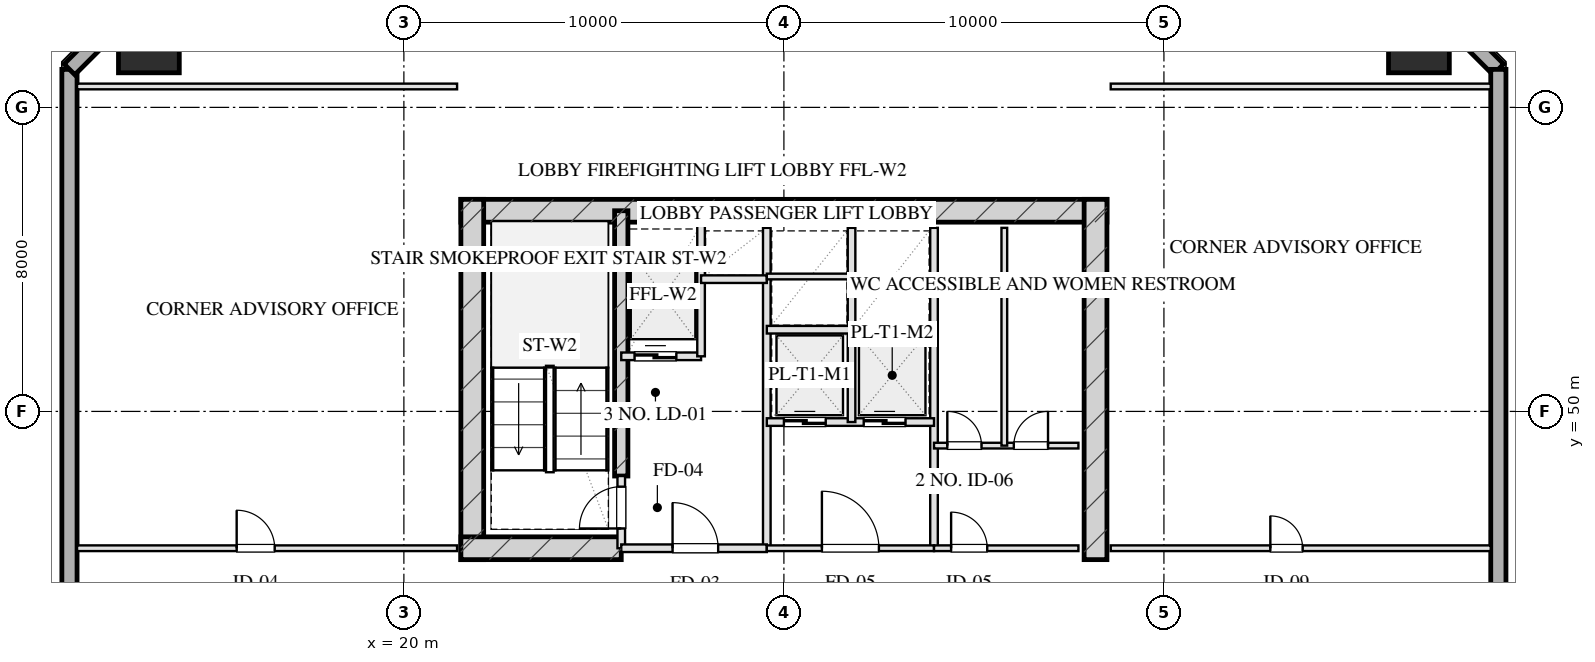
"""IFC4 building model, lengths in metres.
Left out: names, types, materials, properties, quantities, classifications, styles, units other than length and angle.
Written with IfcOpenShell. Run it as: python <this file> out.ifc"""

import sys

from ifc_helpers import new_model, si_unit, direction, frame, frame_2d, origin, origin_2d, place, context, subcontext, project, spatial, rectangle, hollow_rectangle, extrude, element, fill, save


model = new_model("IFC4")
c1 = context("Model", 3, precision=1e-05, world=origin(), true_north=direction((0.0, 1.0)))
c2 = subcontext(c1, "Body", "Model", "MODEL_VIEW")
j1 = project(units=[si_unit("LENGTHUNIT", "METRE"), si_unit("PLANEANGLEUNIT", "RADIAN")], contexts=[c1])
p1 = place(None, origin())
s1 = spatial("IfcSite", under=j1, at=p1, CompositionType="ELEMENT")
p2 = place(p1, origin())
s2 = spatial("IfcBuilding", under=s1, at=p2, CompositionType="ELEMENT")
p3 = place(p2, frame((0.0, 0.0, 106.95)))
s3 = spatial("IfcBuildingStorey", under=s2, at=p3, CompositionType="ELEMENT", Elevation=106.95)
p4 = place(p3, frame((21.5, 55.28, 0.0), z_axis=(0.0, 0.0, 1.0), x_axis=(1.0, 0.0, 0.0)))
e1 = element("IfcWall", 1, at=p4, inside=s3, PredefinedType="SHEAR", context=c2, shape_type="SweptSolid", body=[
    extrude(rectangle(XDim=17.0, YDim=0.6, at=frame_2d((8.5, 0.0))), origin(), (0.0, 0.0, 1.0), 3.45),
])
for number, where, z_axis, x_axis in (
    (2, (21.8, 46.1, 0.0), (0.0, 0.0, 1.0), (0.0, 1.0, 0.0)),
    (3, (38.2, 46.1, 0.0), (0.0, 0.0, 1.0), (0.0, 1.0, 0.0)),
):
    element("IfcWall", number, at=place(p3, frame(where, z_axis=z_axis, x_axis=x_axis)), inside=s3, PredefinedType="SHEAR", context=c2, shape_type="SweptSolid", body=[
        extrude(rectangle(XDim=9.48, YDim=0.6, at=frame_2d((4.74, 0.0))), origin(), (0.0, 0.0, 1.0), 3.45),
    ])
p5 = place(p3, frame((25.72, 48.3, 0.0), z_axis=(0.0, 0.0, 1.0), x_axis=(0.0, 1.0, 0.0)))
e4 = element("IfcWall", 4, at=p5, inside=s3, PredefinedType="SHEAR", context=c2, shape_type="SweptSolid", body=[
    extrude(rectangle(XDim=6.98, YDim=0.35, at=frame_2d((3.49, 0.0))), origin(), (0.0, 0.0, 1.0), 3.45),
])
p6 = place(p3, frame((21.5, 46.4, 0.0), z_axis=(0.0, 0.0, 1.0), x_axis=(1.0, 0.0, 0.0)))
e5 = element("IfcWall", 5, at=p6, inside=s3, PredefinedType="SHEAR", context=c2, shape_type="SweptSolid", body=[
    extrude(rectangle(XDim=4.22, YDim=0.6, at=frame_2d((2.11, 0.0))), origin(), (0.0, 0.0, 1.0), 3.45),
])
for number, where, z_axis, x_axis in (
    (6, (46.71, 59.71, 0.0), (0.0, 0.0, 1.0), (1.0, 0.0, 0.0)),
    (7, (13.29, 59.71, 0.0), (0.0, 0.0, 1.0), (1.0, 0.0, 0.0)),
):
    element("IfcColumn", number, at=place(p3, frame(where, z_axis=z_axis, x_axis=x_axis)), inside=s3, PredefinedType="COLUMN", context=c2, shape_type="SweptSolid", body=[
        extrude(hollow_rectangle(XDim=1.6, YDim=1.6, WallThickness=0.055, at=origin_2d()), origin(), (0.0, 0.0, 1.0), 3.451),
    ])
p7 = place(p3, frame((11.2, 9.0, 0.0), z_axis=(0.0, 0.0, 1.0), x_axis=(0.0, 1.0, 0.0)))
e8 = element("IfcWall", 8, at=p7, inside=s3, PredefinedType="SOLIDWALL", context=c2, shape_type="SweptSolid", body=[
    extrude(rectangle(XDim=50.0, YDim=0.4, at=frame_2d((25.0, 0.0))), origin(), (0.0, 0.0, 1.0), 2.61),
])
p8 = place(p7, frame((26.4, 0.0, 0.75)))
e9 = element("IfcOpeningElement", 9, at=p8, cuts=e8, PredefinedType="OPENING", context=c2, shape_type="SweptSolid", body=[
    extrude(rectangle(XDim=2.4, YDim=1.46, at=frame_2d((1.2, 0.73))), frame((0.0, 0.21, 0.0), z_axis=(0.0, -1.0, 0.0), x_axis=(1.0, 0.0, 0.0)), (0.0, 0.0, 1.0), 0.42),
])
for number, where, z_axis, x_axis in (
    (10, (11.2, 59.0, 0.0), (0.0, 0.0, 1.0), (0.707, 0.707, 0.0)),
    (11, (46.0, 61.8, 0.0), (0.0, 0.0, 1.0), (0.707, -0.707, 0.0)),
):
    element("IfcWall", number, at=place(p3, frame(where, z_axis=z_axis, x_axis=x_axis)), inside=s3, PredefinedType="SOLIDWALL", context=c2, shape_type="SweptSolid", body=[
        extrude(rectangle(XDim=3.96, YDim=0.4, at=frame_2d((1.98, 0.0))), origin(), (0.0, 0.0, 1.0), 2.61),
    ])
p9 = place(p3, frame((48.8, 59.0, 0.0), z_axis=(0.0, 0.0, 1.0), x_axis=(0.0, -1.0, 0.0)))
e12 = element("IfcWall", 12, at=p9, inside=s3, PredefinedType="SOLIDWALL", context=c2, shape_type="SweptSolid", body=[
    extrude(rectangle(XDim=50.0, YDim=0.4, at=frame_2d((25.0, 0.0))), origin(), (0.0, 0.0, 1.0), 2.61),
])
p10 = place(p9, frame((30.2, 0.0, 0.75)))
e13 = element("IfcOpeningElement", 13, at=p10, cuts=e12, PredefinedType="OPENING", context=c2, shape_type="SweptSolid", body=[
    extrude(rectangle(XDim=2.4, YDim=1.46, at=frame_2d((1.2, 0.73))), frame((0.0, 0.21, 0.0), z_axis=(0.0, -1.0, 0.0), x_axis=(1.0, 0.0, 0.0)), (0.0, 0.0, 1.0), 0.42),
])
p11 = place(p9, frame((17.4, 0.0, 0.75)))
e14 = element("IfcOpeningElement", 14, at=p11, cuts=e12, PredefinedType="OPENING", context=c2, shape_type="SweptSolid", body=[
    extrude(rectangle(XDim=2.4, YDim=1.46, at=frame_2d((1.2, 0.73))), frame((0.0, 0.21, 0.0), z_axis=(0.0, -1.0, 0.0), x_axis=(1.0, 0.0, 0.0)), (0.0, 0.0, 1.0), 0.42),
])
p12 = place(p3, frame((25.72, 46.4, 0.0), z_axis=(0.0, 0.0, 1.0), x_axis=(0.0, 1.0, 0.0)))
e15 = element("IfcWall", 15, at=p12, inside=s3, PredefinedType="PARTITIONING", context=c2, shape_type="SweptSolid", body=[
    extrude(rectangle(XDim=1.9, YDim=0.2, at=frame_2d((0.95, 0.0))), origin(), (0.0, 0.0, 1.0), 3.175),
])
p13 = place(p12, frame((0.52, 0.0, 0.0)))
e16 = element("IfcOpeningElement", 16, at=p13, cuts=e15, PredefinedType="OPENING", context=c2, shape_type="SweptSolid", body=[
    extrude(rectangle(XDim=1.1, YDim=2.05, at=frame_2d((0.55, 1.025))), frame((0.0, 0.11, 0.0), z_axis=(0.0, -1.0, 0.0), x_axis=(1.0, 0.0, 0.0)), (0.0, 0.0, 1.0), 0.22),
])
p14 = place(p3, frame((29.55, 46.4, 0.0), z_axis=(0.0, 0.0, 1.0), x_axis=(0.0, 1.0, 0.0)))
e17 = element("IfcWall", 17, at=p14, inside=s3, PredefinedType="PARTITIONING", context=c2, shape_type="SweptSolid", body=[
    extrude(rectangle(XDim=8.43, YDim=0.2, at=frame_2d((4.215, 0.0))), origin(), (0.0, 0.0, 1.0), 3.175),
])
p15 = place(p3, frame((25.72, 46.4, 0.0), z_axis=(0.0, 0.0, 1.0), x_axis=(1.0, 0.0, 0.0)))
e18 = element("IfcWall", 18, at=p15, inside=s3, PredefinedType="PARTITIONING", context=c2, shape_type="SweptSolid", body=[
    extrude(rectangle(XDim=3.83, YDim=0.2, at=frame_2d((1.915, 0.0))), origin(), (0.0, 0.0, 1.0), 3.175),
])
p16 = place(p15, frame((1.35, 0.0, 0.0)))
e19 = element("IfcOpeningElement", 19, at=p16, cuts=e18, PredefinedType="OPENING", context=c2, shape_type="SweptSolid", body=[
    extrude(rectangle(XDim=1.2, YDim=2.05, at=frame_2d((0.6, 1.025))), frame((0.0, 0.11, 0.0), z_axis=(0.0, -1.0, 0.0), x_axis=(1.0, 0.0, 0.0)), (0.0, 0.0, 1.0), 0.22),
])
p17 = place(p3, frame((25.72, 51.45, 0.0), z_axis=(0.0, 0.0, 1.0), x_axis=(1.0, 0.0, 0.0)))
e20 = element("IfcWall", 20, at=p17, inside=s3, PredefinedType="PARTITIONING", context=c2, shape_type="SweptSolid", body=[
    extrude(rectangle(XDim=2.1, YDim=0.2, at=frame_2d((1.05, 0.0))), origin(), (0.0, 0.0, 1.0), 3.175),
])
p18 = place(p17, frame((0.35, 0.0, 0.0)))
e21 = element("IfcOpeningElement", 21, at=p18, cuts=e20, PredefinedType="OPENING", context=c2, shape_type="SweptSolid", body=[
    extrude(rectangle(XDim=1.1, YDim=2.05, at=frame_2d((0.55, 1.025))), frame((0.0, 0.11, 0.0), z_axis=(0.0, -1.0, 0.0), x_axis=(1.0, 0.0, 0.0)), (0.0, 0.0, 1.0), 0.22),
])
p19 = place(p3, frame((27.82, 51.45, 0.0), z_axis=(0.0, 0.0, 1.0), x_axis=(0.0, 1.0, 0.0)))
e22 = element("IfcWall", 22, at=p19, inside=s3, PredefinedType="PARTITIONING", context=c2, shape_type="SweptSolid", body=[
    extrude(rectangle(XDim=3.7, YDim=0.2, at=frame_2d((1.85, 0.0))), origin(), (0.0, 0.0, 1.0), 3.175),
])
p20 = place(p3, frame((27.82, 53.48, 0.0), z_axis=(0.0, 0.0, 1.0), x_axis=(1.0, 0.0, 0.0)))
e23 = element("IfcWall", 23, at=p20, inside=s3, PredefinedType="PARTITIONING", context=c2, shape_type="SweptSolid", body=[
    extrude(rectangle(XDim=1.73, YDim=0.2, at=frame_2d((0.865, 0.0))), origin(), (0.0, 0.0, 1.0), 3.175),
])
p21 = place(p3, frame((33.95, 46.4, 0.0), z_axis=(0.0, 0.0, 1.0), x_axis=(0.0, 1.0, 0.0)))
e24 = element("IfcWall", 24, at=p21, inside=s3, PredefinedType="PARTITIONING", context=c2, shape_type="SweptSolid", body=[
    extrude(rectangle(XDim=8.43, YDim=0.2, at=frame_2d((4.215, 0.0))), origin(), (0.0, 0.0, 1.0), 3.175),
])
p22 = place(p3, frame((29.55, 46.4, 0.0), z_axis=(0.0, 0.0, 1.0), x_axis=(1.0, 0.0, 0.0)))
e25 = element("IfcWall", 25, at=p22, inside=s3, PredefinedType="PARTITIONING", context=c2, shape_type="SweptSolid", body=[
    extrude(rectangle(XDim=4.4, YDim=0.15, at=frame_2d((2.2, 0.0))), origin(), (0.0, 0.0, 1.0), 3.175),
])
p23 = place(p22, frame((1.45, 0.0, 0.0)))
e26 = element("IfcOpeningElement", 26, at=p23, cuts=e25, PredefinedType="OPENING", context=c2, shape_type="SweptSolid", body=[
    extrude(rectangle(XDim=1.5, YDim=2.05, at=frame_2d((0.75, 1.025))), frame((0.0, 0.085, 0.0), z_axis=(0.0, -1.0, 0.0), x_axis=(1.0, 0.0, 0.0)), (0.0, 0.0, 1.0), 0.17),
])
p24 = place(p3, frame((29.55, 49.72, 0.0), z_axis=(0.0, 0.0, 1.0), x_axis=(1.0, 0.0, 0.0)))
e27 = element("IfcWall", 27, at=p24, inside=s3, PredefinedType="PARTITIONING", context=c2, shape_type="SweptSolid", body=[
    extrude(rectangle(XDim=4.4, YDim=0.2, at=frame_2d((2.2, 0.0))), origin(), (0.0, 0.0, 1.0), 3.175),
])
p25 = place(p24, frame((0.45, 0.0, 0.0)))
e28 = element("IfcOpeningElement", 28, at=p25, cuts=e27, PredefinedType="OPENING", context=c2, shape_type="SweptSolid", body=[
    extrude(rectangle(XDim=1.1, YDim=2.05, at=frame_2d((0.55, 1.025))), frame((0.0, 0.11, 0.0), z_axis=(0.0, -1.0, 0.0), x_axis=(1.0, 0.0, 0.0)), (0.0, 0.0, 1.0), 0.22),
])
p26 = place(p24, frame((2.55, 0.0, 0.0)))
e29 = element("IfcOpeningElement", 29, at=p26, cuts=e27, PredefinedType="OPENING", context=c2, shape_type="SweptSolid", body=[
    extrude(rectangle(XDim=1.1, YDim=2.05, at=frame_2d((0.55, 1.025))), frame((0.0, 0.11, 0.0), z_axis=(0.0, -1.0, 0.0), x_axis=(1.0, 0.0, 0.0)), (0.0, 0.0, 1.0), 0.22),
])
p27 = place(p3, frame((31.78, 49.72, 0.0), z_axis=(0.0, 0.0, 1.0), x_axis=(0.0, 1.0, 0.0)))
e30 = element("IfcWall", 30, at=p27, inside=s3, PredefinedType="PARTITIONING", context=c2, shape_type="SweptSolid", body=[
    extrude(rectangle(XDim=5.11, YDim=0.2, at=frame_2d((2.555, 0.0))), origin(), (0.0, 0.0, 1.0), 3.175),
])
p28 = place(p3, frame((29.55, 52.15, 0.0), z_axis=(0.0, 0.0, 1.0), x_axis=(1.0, 0.0, 0.0)))
e31 = element("IfcWall", 31, at=p28, inside=s3, PredefinedType="PARTITIONING", context=c2, shape_type="SweptSolid", body=[
    extrude(rectangle(XDim=4.4, YDim=0.2, at=frame_2d((2.2, 0.0))), origin(), (0.0, 0.0, 1.0), 3.175),
])
p29 = place(p3, frame((29.55, 53.55, 0.0), z_axis=(0.0, 0.0, 1.0), x_axis=(1.0, 0.0, 0.0)))
e32 = element("IfcWall", 32, at=p29, inside=s3, PredefinedType="PARTITIONING", context=c2, shape_type="SweptSolid", body=[
    extrude(rectangle(XDim=2.23, YDim=0.15, at=frame_2d((1.115, 0.0))), origin(), (0.0, 0.0, 1.0), 3.175),
])
p30 = place(p3, frame((33.95, 46.4, 0.0), z_axis=(0.0, 0.0, 1.0), x_axis=(1.0, 0.0, 0.0)))
e33 = element("IfcWall", 33, at=p30, inside=s3, PredefinedType="PARTITIONING", context=c2, shape_type="SweptSolid", body=[
    extrude(rectangle(XDim=3.8, YDim=0.15, at=frame_2d((1.9, 0.0))), origin(), (0.0, 0.0, 1.0), 3.175),
])
p31 = place(p30, frame((0.45, 0.0, 0.0)))
e34 = element("IfcOpeningElement", 34, at=p31, cuts=e33, PredefinedType="OPENING", context=c2, shape_type="SweptSolid", body=[
    extrude(rectangle(XDim=0.95, YDim=2.05, at=frame_2d((0.475, 1.025))), frame((0.0, 0.085, 0.0), z_axis=(0.0, -1.0, 0.0), x_axis=(1.0, 0.0, 0.0)), (0.0, 0.0, 1.0), 0.17),
])
p32 = place(p3, frame((33.95, 49.1, 0.0), z_axis=(0.0, 0.0, 1.0), x_axis=(1.0, 0.0, 0.0)))
e35 = element("IfcWall", 35, at=p32, inside=s3, PredefinedType="PARTITIONING", context=c2, shape_type="SweptSolid", body=[
    extrude(rectangle(XDim=3.8, YDim=0.15, at=frame_2d((1.9, 0.0))), origin(), (0.0, 0.0, 1.0), 3.175),
])
p33 = place(p32, frame((0.35, 0.0, 0.0)))
e36 = element("IfcOpeningElement", 36, at=p33, cuts=e35, PredefinedType="OPENING", context=c2, shape_type="SweptSolid", body=[
    extrude(rectangle(XDim=0.9, YDim=2.05, at=frame_2d((0.45, 1.025))), frame((0.0, 0.085, 0.0), z_axis=(0.0, -1.0, 0.0), x_axis=(1.0, 0.0, 0.0)), (0.0, 0.0, 1.0), 0.17),
])
p34 = place(p32, frame((2.1, 0.0, 0.0)))
e37 = element("IfcOpeningElement", 37, at=p34, cuts=e35, PredefinedType="OPENING", context=c2, shape_type="SweptSolid", body=[
    extrude(rectangle(XDim=0.9, YDim=2.05, at=frame_2d((0.45, 1.025))), frame((0.0, 0.085, 0.0), z_axis=(0.0, -1.0, 0.0), x_axis=(1.0, 0.0, 0.0)), (0.0, 0.0, 1.0), 0.17),
])
p35 = place(p3, frame((35.8, 49.1, 0.0), z_axis=(0.0, 0.0, 1.0), x_axis=(0.0, 1.0, 0.0)))
e38 = element("IfcWall", 38, at=p35, inside=s3, PredefinedType="PARTITIONING", context=c2, shape_type="SweptSolid", body=[
    extrude(rectangle(XDim=5.73, YDim=0.15, at=frame_2d((2.865, 0.0))), origin(), (0.0, 0.0, 1.0), 3.175),
])
p36 = place(p3, frame((11.4, 58.55, 0.0), z_axis=(0.0, 0.0, 1.0), x_axis=(1.0, 0.0, 0.0)))
e39 = element("IfcWall", 39, at=p36, inside=s3, PredefinedType="PARTITIONING", context=c2, shape_type="SweptSolid", body=[
    extrude(rectangle(XDim=10.0, YDim=0.15, at=frame_2d((5.0, 0.0))), origin(), (0.0, 0.0, 1.0), 3.175),
])
p37 = place(p3, frame((11.4, 46.4, 0.0), z_axis=(0.0, 0.0, 1.0), x_axis=(1.0, 0.0, 0.0)))
e40 = element("IfcWall", 40, at=p37, inside=s3, PredefinedType="PARTITIONING", context=c2, shape_type="SweptSolid", body=[
    extrude(rectangle(XDim=10.0, YDim=0.15, at=frame_2d((5.0, 0.0))), origin(), (0.0, 0.0, 1.0), 3.175),
])
p38 = place(p37, frame((4.2, 0.0, 0.0)))
e41 = element("IfcOpeningElement", 41, at=p38, cuts=e40, PredefinedType="OPENING", context=c2, shape_type="SweptSolid", body=[
    extrude(rectangle(XDim=1.0, YDim=2.05, at=frame_2d((0.5, 1.025))), frame((0.0, 0.085, 0.0), z_axis=(0.0, -1.0, 0.0), x_axis=(1.0, 0.0, 0.0)), (0.0, 0.0, 1.0), 0.17),
])
p39 = place(p3, frame((38.6, 58.55, 0.0), z_axis=(0.0, 0.0, 1.0), x_axis=(1.0, 0.0, 0.0)))
e42 = element("IfcWall", 42, at=p39, inside=s3, PredefinedType="PARTITIONING", context=c2, shape_type="SweptSolid", body=[
    extrude(rectangle(XDim=10.0, YDim=0.15, at=frame_2d((5.0, 0.0))), origin(), (0.0, 0.0, 1.0), 3.175),
])
p40 = place(p3, frame((38.6, 46.4, 0.0), z_axis=(0.0, 0.0, 1.0), x_axis=(1.0, 0.0, 0.0)))
e43 = element("IfcWall", 43, at=p40, inside=s3, PredefinedType="PARTITIONING", context=c2, shape_type="SweptSolid", body=[
    extrude(rectangle(XDim=10.0, YDim=0.15, at=frame_2d((5.0, 0.0))), origin(), (0.0, 0.0, 1.0), 3.175),
])
p41 = place(p40, frame((4.2, 0.0, 0.0)))
e44 = element("IfcOpeningElement", 44, at=p41, cuts=e43, PredefinedType="OPENING", context=c2, shape_type="SweptSolid", body=[
    extrude(rectangle(XDim=0.85, YDim=2.05, at=frame_2d((0.425, 1.025))), frame((0.0, 0.085, 0.0), z_axis=(0.0, -1.0, 0.0), x_axis=(1.0, 0.0, 0.0)), (0.0, 0.0, 1.0), 0.17),
])
p42 = place(p13, origin())
e45 = element("IfcDoor", 45, at=p42, inside=s3, OperationType="SINGLE_SWING_LEFT", PredefinedType="DOOR", context=c2, shape_type="SweptSolid", body=[
    extrude(rectangle(XDim=1.1, YDim=2.05, at=frame_2d((0.55, 1.025))), frame((0.0, 0.025, 0.0), z_axis=(0.0, -1.0, 0.0), x_axis=(1.0, 0.0, 0.0)), (0.0, 0.0, 1.0), 0.05),
])
fill(e16, e45)
p43 = place(p16, origin())
e46 = element("IfcDoor", 46, at=p43, inside=s3, OperationType="SINGLE_SWING_LEFT", PredefinedType="DOOR", context=c2, shape_type="SweptSolid", body=[
    extrude(rectangle(XDim=1.2, YDim=2.05, at=frame_2d((0.6, 1.025))), frame((0.0, 0.025, 0.0), z_axis=(0.0, -1.0, 0.0), x_axis=(1.0, 0.0, 0.0)), (0.0, 0.0, 1.0), 0.05),
])
fill(e19, e46)
p44 = place(p18, origin())
e47 = element("IfcDoor", 47, at=p44, inside=s3, OperationType="DOUBLE_DOOR_SLIDING", PredefinedType="DOOR", context=c2, shape_type="SweptSolid", body=[
    extrude(rectangle(XDim=1.1, YDim=2.05, at=frame_2d((0.55, 1.025))), frame((0.0, 0.025, 0.0), z_axis=(0.0, -1.0, 0.0), x_axis=(1.0, 0.0, 0.0)), (0.0, 0.0, 1.0), 0.05),
])
fill(e21, e47)
p45 = place(p23, origin())
e48 = element("IfcDoor", 48, at=p45, inside=s3, OperationType="SINGLE_SWING_LEFT", PredefinedType="DOOR", context=c2, shape_type="SweptSolid", body=[
    extrude(rectangle(XDim=1.5, YDim=2.05, at=frame_2d((0.75, 1.025))), frame((0.0, 0.025, 0.0), z_axis=(0.0, -1.0, 0.0), x_axis=(1.0, 0.0, 0.0)), (0.0, 0.0, 1.0), 0.05),
])
fill(e26, e48)
p46 = place(p25, origin())
e49 = element("IfcDoor", 49, at=p46, inside=s3, OperationType="DOUBLE_DOOR_SLIDING", PredefinedType="DOOR", context=c2, shape_type="SweptSolid", body=[
    extrude(rectangle(XDim=1.1, YDim=2.05, at=frame_2d((0.55, 1.025))), frame((0.0, 0.025, 0.0), z_axis=(0.0, -1.0, 0.0), x_axis=(1.0, 0.0, 0.0)), (0.0, 0.0, 1.0), 0.05),
])
fill(e28, e49)
p47 = place(p26, origin())
e50 = element("IfcDoor", 50, at=p47, inside=s3, OperationType="DOUBLE_DOOR_SLIDING", PredefinedType="DOOR", context=c2, shape_type="SweptSolid", body=[
    extrude(rectangle(XDim=1.1, YDim=2.05, at=frame_2d((0.55, 1.025))), frame((0.0, 0.025, 0.0), z_axis=(0.0, -1.0, 0.0), x_axis=(1.0, 0.0, 0.0)), (0.0, 0.0, 1.0), 0.05),
])
fill(e29, e50)
p48 = place(p31, origin())
e51 = element("IfcDoor", 51, at=p48, inside=s3, OperationType="SINGLE_SWING_LEFT", PredefinedType="DOOR", context=c2, shape_type="SweptSolid", body=[
    extrude(rectangle(XDim=0.95, YDim=2.05, at=frame_2d((0.475, 1.025))), frame((0.0, 0.025, 0.0), z_axis=(0.0, -1.0, 0.0), x_axis=(1.0, 0.0, 0.0)), (0.0, 0.0, 1.0), 0.05),
])
fill(e34, e51)
p49 = place(p33, origin())
e52 = element("IfcDoor", 52, at=p49, inside=s3, OperationType="SINGLE_SWING_LEFT", PredefinedType="DOOR", context=c2, shape_type="SweptSolid", body=[
    extrude(rectangle(XDim=0.9, YDim=2.05, at=frame_2d((0.45, 1.025))), frame((0.0, 0.025, 0.0), z_axis=(0.0, -1.0, 0.0), x_axis=(1.0, 0.0, 0.0)), (0.0, 0.0, 1.0), 0.05),
])
fill(e36, e52)
p50 = place(p34, origin())
e53 = element("IfcDoor", 53, at=p50, inside=s3, OperationType="SINGLE_SWING_RIGHT", PredefinedType="DOOR", context=c2, shape_type="SweptSolid", body=[
    extrude(rectangle(XDim=0.9, YDim=2.05, at=frame_2d((0.45, 1.025))), frame((0.0, 0.025, 0.0), z_axis=(0.0, -1.0, 0.0), x_axis=(1.0, 0.0, 0.0)), (0.0, 0.0, 1.0), 0.05),
])
fill(e37, e53)
p51 = place(p38, origin())
e54 = element("IfcDoor", 54, at=p51, inside=s3, OperationType="SINGLE_SWING_LEFT", PredefinedType="DOOR", context=c2, shape_type="SweptSolid", body=[
    extrude(rectangle(XDim=1.0, YDim=2.05, at=frame_2d((0.5, 1.025))), frame((0.0, 0.025, 0.0), z_axis=(0.0, -1.0, 0.0), x_axis=(1.0, 0.0, 0.0)), (0.0, 0.0, 1.0), 0.05),
])
fill(e41, e54)
p52 = place(p41, origin())
e55 = element("IfcDoor", 55, at=p52, inside=s3, OperationType="SINGLE_SWING_LEFT", PredefinedType="DOOR", context=c2, shape_type="SweptSolid", body=[
    extrude(rectangle(XDim=0.85, YDim=2.05, at=frame_2d((0.425, 1.025))), frame((0.0, 0.025, 0.0), z_axis=(0.0, -1.0, 0.0), x_axis=(1.0, 0.0, 0.0)), (0.0, 0.0, 1.0), 0.05),
])
fill(e44, e55)
save(model, sys.argv[1])
